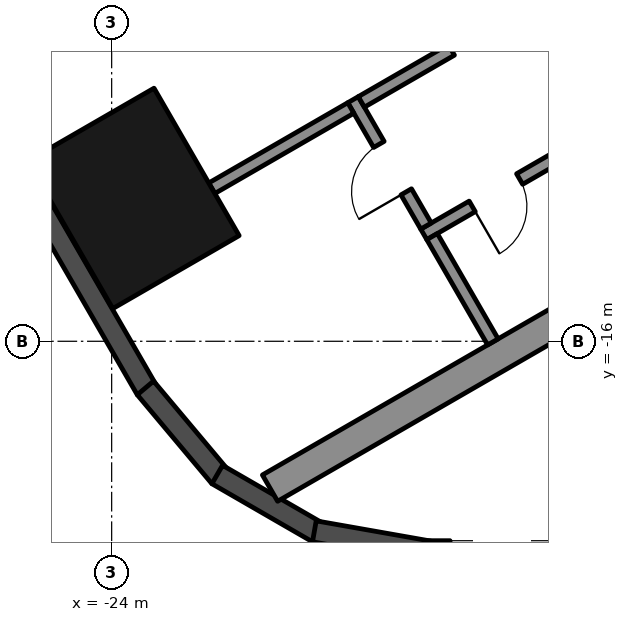
"""IFC4 building model, lengths in metres.
Left out: names, types, materials, properties, quantities, classifications, styles, units other than length and angle.
Written with IfcOpenShell. Run it as: python <this file> out.ifc"""

import sys

from ifc_helpers import new_model, si_unit, direction, frame, frame_2d, origin, origin_2d, place, context, subcontext, project, spatial, rectangle, hollow_rectangle, extrude, element, fill, save


model = new_model("IFC4")
c1 = context("Model", 3, precision=1e-05, world=origin(), true_north=direction((0.0, 1.0)))
c2 = subcontext(c1, "Body", "Model", "MODEL_VIEW")
j1 = project(units=[si_unit("LENGTHUNIT", "METRE"), si_unit("PLANEANGLEUNIT", "RADIAN")], contexts=[c1])
p1 = place(None, origin())
s1 = spatial("IfcSite", under=j1, at=p1, CompositionType="ELEMENT")
p2 = place(p1, origin())
s2 = spatial("IfcBuilding", under=s1, at=p2, CompositionType="ELEMENT")
p3 = place(p2, frame((0.0, 0.0, 61.3)))
s3 = spatial("IfcBuildingStorey", under=s2, at=p3, CompositionType="ELEMENT", Elevation=61.3)
p4 = place(p3, frame((-23.643, -13.65, 0.0), z_axis=(0.0, 0.0, 1.0), x_axis=(-0.5, 0.866025403784, 0.0)))
e1 = element("IfcColumn", 1, at=p4, inside=s3, PredefinedType="COLUMN", context=c2, shape_type="SweptSolid", body=[
    extrude(hollow_rectangle(XDim=2.8, YDim=2.4, WallThickness=0.07, at=origin_2d()), origin(), (0.0, 0.0, 1.0), 3.7),
])
p5 = place(p3, frame((-26.257, -11.893, 0.0), z_axis=(0.0, 0.0, 1.0), x_axis=(0.500018773155, -0.866014564827, 0.0)))
e2 = element("IfcWall", 2, at=p5, inside=s3, PredefinedType="SOLIDWALL", context=c2, shape_type="SweptSolid", body=[
    extrude(rectangle(XDim=5.658, YDim=0.35, at=frame_2d((2.829, 0.0))), origin(), (0.0, 0.0, 1.0), 3.55),
])
for number, where, z_axis, x_axis in (
    (3, (-23.445, -16.768, 0.0), (0.0, 0.0, 1.0), (0.643, -0.766, 0.0)),
    (4, (-22.264, -18.192, 0.0), (0.0, 0.0, 1.0), (0.866, -0.5, 0.0)),
):
    element("IfcWall", number, at=place(p3, frame(where, z_axis=z_axis, x_axis=x_axis)), inside=s3, PredefinedType="SOLIDWALL", context=c2, shape_type="SweptSolid", body=[
        extrude(rectangle(XDim=1.91, YDim=0.35, at=frame_2d((0.955, 0.0))), origin(), (0.0, 0.0, 1.0), 3.55),
    ])
p6 = place(p3, frame((-20.667, -19.126, 0.0), z_axis=(0.0, 0.0, 1.0), x_axis=(0.984798995425, -0.173697837091, 0.0)))
e5 = element("IfcWall", 5, at=p6, inside=s3, PredefinedType="SOLIDWALL", context=c2, shape_type="SweptSolid", body=[
    extrude(rectangle(XDim=1.91, YDim=0.35, at=frame_2d((0.955, 0.0))), origin(), (0.0, 0.0, 1.0), 3.55),
])
p7 = place(p3, frame((-18.816, -19.455, 0.0), z_axis=(0.0, 0.0, 1.0), x_axis=(1.0, 0.0, 0.0)))
e6 = element("IfcWall", 6, at=p7, inside=s3, PredefinedType="SOLIDWALL", context=c2, shape_type="SweptSolid", body=[
    extrude(rectangle(XDim=11.816, YDim=0.35, at=frame_2d((5.908, 0.0))), origin(), (0.0, 0.0, 1.0), 3.55),
])
p8 = place(p7, frame((0.381, 0.0, 0.3)))
e7 = element("IfcOpeningElement", 7, at=p8, cuts=e6, PredefinedType="OPENING", context=c2, shape_type="SweptSolid", body=[
    extrude(rectangle(XDim=1.7, YDim=2.65, at=frame_2d((0.85, 1.325))), frame((0.0, 0.185, 0.0), z_axis=(0.0, -1.0, 0.0), x_axis=(1.0, 0.0, 0.0)), (0.0, 0.0, 1.0), 0.37),
])
p9 = place(p7, frame((7.665, 0.0, 0.0)))
e8 = element("IfcOpeningElement", 8, at=p9, cuts=e6, PredefinedType="OPENING", context=c2, shape_type="SweptSolid", body=[
    extrude(rectangle(XDim=2.4, YDim=2.4, at=frame_2d((1.2, 1.2))), frame((0.0, 0.185, 0.0), z_axis=(0.0, -1.0, 0.0), x_axis=(1.0, 0.0, 0.0)), (0.0, 0.0, 1.0), 0.37),
])
p10 = place(p7, frame((3.866, 0.0, 0.3)))
e9 = element("IfcOpeningElement", 9, at=p10, cuts=e6, PredefinedType="OPENING", context=c2, shape_type="SweptSolid", body=[
    extrude(rectangle(XDim=1.5, YDim=2.65, at=frame_2d((0.75, 1.325))), frame((0.0, 0.185, 0.0), z_axis=(0.0, -1.0, 0.0), x_axis=(1.0, 0.0, 0.0)), (0.0, 0.0, 1.0), 0.37),
])
p11 = place(p7, frame((5.666, 0.0, 0.3)))
e10 = element("IfcOpeningElement", 10, at=p11, cuts=e6, PredefinedType="OPENING", context=c2, shape_type="SweptSolid", body=[
    extrude(rectangle(XDim=1.5, YDim=2.65, at=frame_2d((0.75, 1.325))), frame((0.0, 0.185, 0.0), z_axis=(0.0, -1.0, 0.0), x_axis=(1.0, 0.0, 0.0)), (0.0, 0.0, 1.0), 0.37),
])
p12 = place(p3, frame((-8.547, -10.997, 0.0), z_axis=(0.0, 0.0, 1.0), x_axis=(-0.866025009528, -0.500000682871, 0.0)))
e11 = element("IfcWall", 11, at=p12, inside=s3, PredefinedType="SHEAR", context=c2, shape_type="SweptSolid", body=[
    extrude(rectangle(XDim=14.837, YDim=0.5, at=frame_2d((7.418, 0.0))), origin(), (0.0, 0.0, 1.0), 3.5),
])
p13 = place(p3, frame((-10.068, -9.162, 0.0), z_axis=(0.0, 0.0, 1.0), x_axis=(-0.866032725843, -0.499987317609, 0.0)))
e12 = element("IfcWall", 12, at=p13, inside=s3, PredefinedType="SHEAR", context=c2, shape_type="SweptSolid", body=[
    extrude(rectangle(XDim=10.16, YDim=0.2, at=frame_2d((5.08, 0.0))), origin(), (0.0, 0.0, 1.0), 3.5),
])
p14 = place(p13, frame((3.26, 0.0, 0.0)))
e13 = element("IfcOpeningElement", 13, at=p14, cuts=e12, PredefinedType="OPENING", context=c2, shape_type="SweptSolid", body=[
    extrude(rectangle(XDim=0.9, YDim=2.1, at=frame_2d((0.45, 1.05))), frame((0.0, 0.11, 0.0), z_axis=(0.0, -1.0, 0.0), x_axis=(1.0, 0.0, 0.0)), (0.0, 0.0, 1.0), 0.22),
])
p15 = place(p13, frame((8.34, 0.0, 0.0)))
e14 = element("IfcOpeningElement", 14, at=p15, cuts=e12, PredefinedType="OPENING", context=c2, shape_type="SweptSolid", body=[
    extrude(rectangle(XDim=0.9, YDim=2.1, at=frame_2d((0.45, 1.05))), frame((0.0, 0.11, 0.0), z_axis=(0.0, -1.0, 0.0), x_axis=(1.0, 0.0, 0.0)), (0.0, 0.0, 1.0), 0.22),
])
p16 = place(p3, frame((-20.031, -12.026, 0.0), z_axis=(0.0, 0.0, 1.0), x_axis=(0.500033551112, -0.866006032174, 0.0)))
e15 = element("IfcWall", 15, at=p16, inside=s3, PredefinedType="SHEAR", context=c2, shape_type="SweptSolid", body=[
    extrude(rectangle(XDim=2.4, YDim=0.2, at=frame_2d((1.2, 0.0))), origin(), (0.0, 0.0, 1.0), 3.5),
])
p17 = place(p16, frame((0.85, 0.0, 0.0)))
e16 = element("IfcOpeningElement", 16, at=p17, cuts=e15, PredefinedType="OPENING", context=c2, shape_type="SweptSolid", body=[
    extrude(rectangle(XDim=0.9, YDim=2.1, at=frame_2d((0.45, 1.05))), frame((0.0, 0.11, 0.0), z_axis=(0.0, -1.0, 0.0), x_axis=(1.0, 0.0, 0.0)), (0.0, 0.0, 1.0), 0.22),
])
p18 = place(p3, frame((-18.413, -11.208, 0.0), z_axis=(0.0, 0.0, 1.0), x_axis=(-0.866038183914, -0.499977863513, 0.0)))
e17 = element("IfcWall", 17, at=p18, inside=s3, PredefinedType="SHEAR", context=c2, shape_type="SweptSolid", body=[
    extrude(rectangle(XDim=1.71, YDim=0.2, at=frame_2d((0.855, 0.0))), origin(), (0.0, 0.0, 1.0), 3.5),
])
p19 = place(p3, frame((-18.73, -14.278, 0.0), z_axis=(0.0, 0.0, 1.0), x_axis=(0.50002537861, -0.866010750942, 0.0)))
e18 = element("IfcWall", 18, at=p19, inside=s3, PredefinedType="SHEAR", context=c2, shape_type="SweptSolid", body=[
    extrude(rectangle(XDim=2.0, YDim=0.2, at=frame_2d((1.0, 0.0))), origin(), (0.0, 0.0, 1.0), 3.5),
])
p20 = place(p3, frame((-20.067, -12.163, 0.0), z_axis=(0.0, 0.0, 1.0), x_axis=(-0.866060851709, -0.499938597367, 0.0)))
e19 = element("IfcWall", 19, at=p20, inside=s3, PredefinedType="SHEAR", context=c2, shape_type="SweptSolid", body=[
    extrude(rectangle(XDim=2.64, YDim=0.2, at=frame_2d((1.32, 0.0))), origin(), (0.0, 0.0, 1.0), 3.5),
])
p21 = place(p15, origin())
e20 = element("IfcDoor", 20, at=p21, inside=s3, OperationType="SINGLE_SWING_RIGHT", PredefinedType="DOOR", context=c2, shape_type="SweptSolid", body=[
    extrude(rectangle(XDim=0.9, YDim=2.1, at=frame_2d((0.45, 1.05))), frame((0.0, 0.025, 0.0), z_axis=(0.0, -1.0, 0.0), x_axis=(1.0, 0.0, 0.0)), (0.0, 0.0, 1.0), 0.05),
])
fill(e14, e20)
p22 = place(p17, frame((0.9, 0.0, 0.0), z_axis=(0.0, 0.0, 1.0), x_axis=(-1.0, 0.0, 0.0)))
e21 = element("IfcDoor", 21, at=p22, inside=s3, OperationType="SINGLE_SWING_LEFT", PredefinedType="DOOR", context=c2, shape_type="SweptSolid", body=[
    extrude(rectangle(XDim=0.9, YDim=2.1, at=frame_2d((0.45, 1.05))), frame((0.0, 0.025, 0.0), z_axis=(0.0, -1.0, 0.0), x_axis=(1.0, 0.0, 0.0)), (0.0, 0.0, 1.0), 0.05),
])
fill(e16, e21)
save(model, sys.argv[1])
